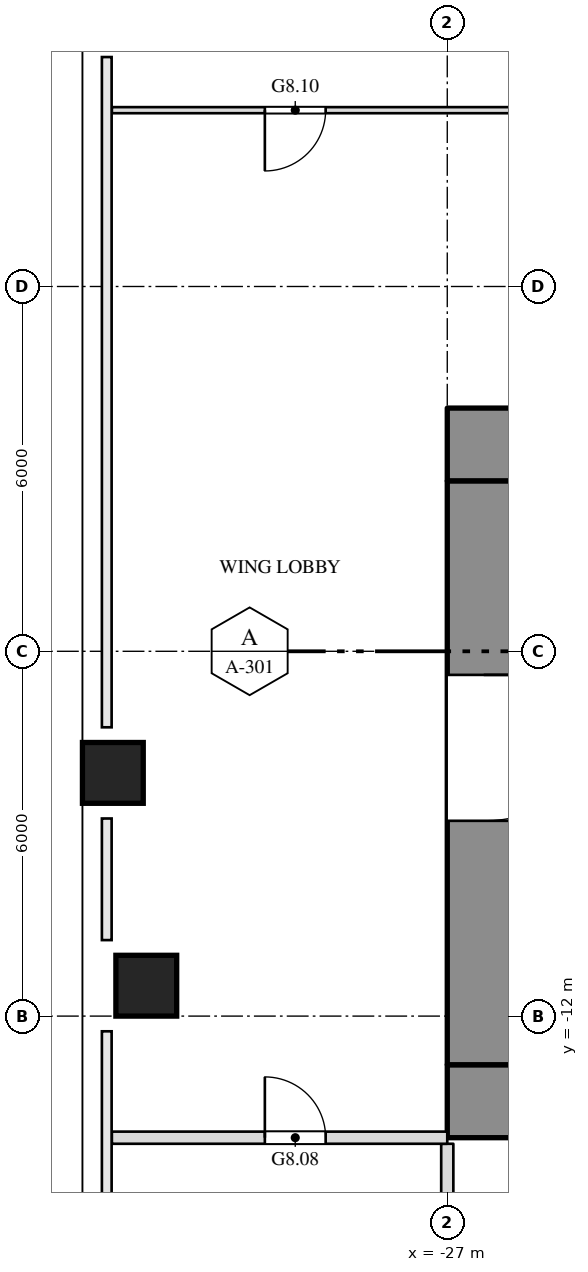
"""IFC4 building model, lengths in metres.
Left out: names, types, materials, properties, quantities, classifications, styles, units other than length and angle.
Written with IfcOpenShell. Run it as: python <this file> out.ifc"""

import sys

from ifc_helpers import new_model, si_unit, direction, frame, frame_2d, origin, origin_2d, place, context, subcontext, project, spatial, rectangle, extrude, element, fill, save


model = new_model("IFC4")
c1 = context("Model", 3, precision=1e-05, world=origin(), true_north=direction((0.0, 1.0)))
c2 = subcontext(c1, "Body", "Model", "MODEL_VIEW")
j1 = project(units=[si_unit("LENGTHUNIT", "METRE"), si_unit("PLANEANGLEUNIT", "RADIAN")], contexts=[c1])
p1 = place(None, origin())
s1 = spatial("IfcSite", under=j1, at=p1, CompositionType="ELEMENT")
p2 = place(p1, origin())
s2 = spatial("IfcBuilding", under=s1, at=p2, CompositionType="ELEMENT")
p3 = place(p2, frame((0.0, 0.0, 48.0)))
s3 = spatial("IfcBuildingStorey", under=s2, at=p3, CompositionType="ELEMENT", Elevation=48.0)
for number, where, z_axis, x_axis in (
    (1, (-31.95, -11.5, 0.0), (0.0, 0.0, 1.0), (1.0, 0.0, 0.0)),
    (2, (-32.5, -8.0, 0.0), (0.0, 0.0, 1.0), (1.0, 0.0, 0.0)),
):
    element("IfcColumn", number, at=place(p3, frame(where, z_axis=z_axis, x_axis=x_axis)), inside=s3, PredefinedType="COLUMN", context=c2, shape_type="SweptSolid", body=[
        extrude(rectangle(XDim=1.0, YDim=1.0, at=origin_2d()), origin(), (0.0, 0.0, 1.0), 4.5),
    ])
p4 = place(p3, frame((-27.0, -2.6, 0.0), z_axis=(0.0, 0.0, 1.0), x_axis=(1.0, 0.0, 0.0)))
e3 = element("IfcWall", 3, at=p4, inside=s3, PredefinedType="SHEAR", context=c2, shape_type="SweptSolid", body=[
    extrude(rectangle(XDim=54.0, YDim=1.2, at=frame_2d((27.0, 0.0))), origin(), (0.0, 0.0, 1.0), 4.3),
])
p5 = place(p4, frame((15.15, 0.0, 0.0)))
e4 = element("IfcOpeningElement", 4, at=p5, cuts=e3, PredefinedType="OPENING", context=c2, shape_type="SweptSolid", body=[
    extrude(rectangle(XDim=2.4, YDim=2.1, at=frame_2d((1.2, 1.05))), frame((0.0, 0.612, 0.0), z_axis=(0.0, -1.0, 0.0), x_axis=(1.0, 0.0, 0.0)), (0.0, 0.0, 1.0), 1.224),
])
p6 = place(p4, frame((36.45, 0.0, 0.0)))
e5 = element("IfcOpeningElement", 5, at=p6, cuts=e3, PredefinedType="OPENING", context=c2, shape_type="SweptSolid", body=[
    extrude(rectangle(XDim=2.4, YDim=2.1, at=frame_2d((1.2, 1.05))), frame((0.0, 0.612, 0.0), z_axis=(0.0, -1.0, 0.0), x_axis=(1.0, 0.0, 0.0)), (0.0, 0.0, 1.0), 1.224),
])
p7 = place(p3, frame((-27.0, -13.4, 0.0), z_axis=(0.0, 0.0, 1.0), x_axis=(1.0, 0.0, 0.0)))
e6 = element("IfcWall", 6, at=p7, inside=s3, PredefinedType="SHEAR", context=c2, shape_type="SweptSolid", body=[
    extrude(rectangle(XDim=54.0, YDim=1.2, at=frame_2d((27.0, 0.0))), origin(), (0.0, 0.0, 1.0), 4.3),
])
p8 = place(p7, frame((16.45, 0.0, 0.0)))
e7 = element("IfcOpeningElement", 7, at=p8, cuts=e6, PredefinedType="OPENING", context=c2, shape_type="SweptSolid", body=[
    extrude(rectangle(XDim=1.0, YDim=2.1, at=frame_2d((0.5, 1.05))), frame((0.0, 0.612, 0.0), z_axis=(0.0, -1.0, 0.0), x_axis=(1.0, 0.0, 0.0)), (0.0, 0.0, 1.0), 1.224),
])
p9 = place(p7, frame((36.55, 0.0, 0.0)))
e8 = element("IfcOpeningElement", 8, at=p9, cuts=e6, PredefinedType="OPENING", context=c2, shape_type="SweptSolid", body=[
    extrude(rectangle(XDim=1.0, YDim=2.1, at=frame_2d((0.5, 1.05))), frame((0.0, 0.612, 0.0), z_axis=(0.0, -1.0, 0.0), x_axis=(1.0, 0.0, 0.0)), (0.0, 0.0, 1.0), 1.224),
])
p10 = place(p3, frame((-26.4, -12.8, 0.0), z_axis=(0.0, 0.0, 1.0), x_axis=(0.0, 1.0, 0.0)))
e9 = element("IfcWall", 9, at=p10, inside=s3, PredefinedType="SHEAR", context=c2, shape_type="SweptSolid", body=[
    extrude(rectangle(XDim=9.6, YDim=1.2, at=frame_2d((4.8, 0.0))), origin(), (0.0, 0.0, 1.0), 4.3),
])
p11 = place(p10, frame((4.012, 0.0, 0.0)))
e10 = element("IfcOpeningElement", 10, at=p11, cuts=e9, PredefinedType="OPENING", context=c2, shape_type="SweptSolid", body=[
    extrude(rectangle(XDim=2.4, YDim=2.1, at=frame_2d((1.2, 1.05))), frame((0.0, 0.612, 0.0), z_axis=(0.0, -1.0, 0.0), x_axis=(1.0, 0.0, 0.0)), (0.0, 0.0, 1.0), 1.224),
])
p12 = place(p3, frame((-27.0, -17.0, 0.0), z_axis=(0.0, 0.0, 1.0), x_axis=(0.0, 1.0, 0.0)))
e11 = element("IfcWall", 11, at=p12, inside=s3, PredefinedType="PARTITIONING", context=c2, shape_type="SweptSolid", body=[
    extrude(rectangle(XDim=2.9, YDim=0.2, at=frame_2d((1.45, 0.0))), origin(), (0.0, 0.0, 1.0), 3.688),
])
p13 = place(p3, frame((-32.516, -14.0, 0.0), z_axis=(0.0, 0.0, 1.0), x_axis=(1.0, 0.0, 0.0)))
e12 = element("IfcWall", 12, at=p13, inside=s3, PredefinedType="PARTITIONING", context=c2, shape_type="SweptSolid", body=[
    extrude(rectangle(XDim=5.516, YDim=0.2, at=frame_2d((2.758, 0.0))), origin(), (0.0, 0.0, 1.0), 4.3),
])
p14 = place(p13, frame((2.516, 0.0, 0.0)))
e13 = element("IfcOpeningElement", 13, at=p14, cuts=e12, PredefinedType="OPENING", context=c2, shape_type="SweptSolid", body=[
    extrude(rectangle(XDim=1.0, YDim=2.1, at=frame_2d((0.5, 1.05))), frame((0.0, 0.112, 0.0), z_axis=(0.0, -1.0, 0.0), x_axis=(1.0, 0.0, 0.0)), (0.0, 0.0, 1.0), 0.224),
])
p15 = place(p3, frame((-32.516, 2.9, 0.0), z_axis=(0.0, 0.0, 1.0), x_axis=(1.0, 0.0, 0.0)))
e14 = element("IfcWall", 14, at=p15, inside=s3, PredefinedType="PARTITIONING", context=c2, shape_type="SweptSolid", body=[
    extrude(rectangle(XDim=65.032, YDim=0.1, at=frame_2d((32.516, 0.0))), origin(), (0.0, 0.0, 1.0), 4.3),
])
p16 = place(p15, frame((2.516, 0.0, 0.0)))
e15 = element("IfcOpeningElement", 15, at=p16, cuts=e14, PredefinedType="OPENING", context=c2, shape_type="SweptSolid", body=[
    extrude(rectangle(XDim=1.0, YDim=2.1, at=frame_2d((0.5, 1.05))), frame((0.0, 0.062, 0.0), z_axis=(0.0, -1.0, 0.0), x_axis=(1.0, 0.0, 0.0)), (0.0, 0.0, 1.0), 0.124),
])
p17 = place(p15, frame((8.616, 0.0, 0.0)))
e16 = element("IfcOpeningElement", 16, at=p17, cuts=e14, PredefinedType="OPENING", context=c2, shape_type="SweptSolid", body=[
    extrude(rectangle(XDim=1.8, YDim=2.1, at=frame_2d((0.9, 1.05))), frame((0.0, 0.062, 0.0), z_axis=(0.0, -1.0, 0.0), x_axis=(1.0, 0.0, 0.0)), (0.0, 0.0, 1.0), 0.124),
])
p18 = place(p15, frame((17.466, 0.0, 0.0)))
e17 = element("IfcOpeningElement", 17, at=p18, cuts=e14, PredefinedType="OPENING", context=c2, shape_type="SweptSolid", body=[
    extrude(rectangle(XDim=2.1, YDim=2.4, at=frame_2d((1.05, 1.2))), frame((0.0, 0.062, 0.0), z_axis=(0.0, -1.0, 0.0), x_axis=(1.0, 0.0, 0.0)), (0.0, 0.0, 1.0), 0.124),
])
p19 = place(p15, frame((26.966, 0.0, 0.0)))
e18 = element("IfcOpeningElement", 18, at=p19, cuts=e14, PredefinedType="OPENING", context=c2, shape_type="SweptSolid", body=[
    extrude(rectangle(XDim=2.1, YDim=2.4, at=frame_2d((1.05, 1.2))), frame((0.0, 0.062, 0.0), z_axis=(0.0, -1.0, 0.0), x_axis=(1.0, 0.0, 0.0)), (0.0, 0.0, 1.0), 0.124),
])
p20 = place(p15, frame((36.116, 0.0, 0.0)))
e19 = element("IfcOpeningElement", 19, at=p20, cuts=e14, PredefinedType="OPENING", context=c2, shape_type="SweptSolid", body=[
    extrude(rectangle(XDim=1.8, YDim=2.1, at=frame_2d((0.9, 1.05))), frame((0.0, 0.062, 0.0), z_axis=(0.0, -1.0, 0.0), x_axis=(1.0, 0.0, 0.0)), (0.0, 0.0, 1.0), 0.124),
])
p21 = place(p15, frame((43.016, 0.0, 0.0)))
e20 = element("IfcOpeningElement", 20, at=p21, cuts=e14, PredefinedType="OPENING", context=c2, shape_type="SweptSolid", body=[
    extrude(rectangle(XDim=1.0, YDim=2.1, at=frame_2d((0.5, 1.05))), frame((0.0, 0.062, 0.0), z_axis=(0.0, -1.0, 0.0), x_axis=(1.0, 0.0, 0.0)), (0.0, 0.0, 1.0), 0.124),
])
p22 = place(p15, frame((47.966, 0.0, 0.0)))
e21 = element("IfcOpeningElement", 21, at=p22, cuts=e14, PredefinedType="OPENING", context=c2, shape_type="SweptSolid", body=[
    extrude(rectangle(XDim=2.1, YDim=2.4, at=frame_2d((1.05, 1.2))), frame((0.0, 0.062, 0.0), z_axis=(0.0, -1.0, 0.0), x_axis=(1.0, 0.0, 0.0)), (0.0, 0.0, 1.0), 0.124),
])
p23 = place(p15, frame((54.466, 0.0, 0.0)))
e22 = element("IfcOpeningElement", 22, at=p23, cuts=e14, PredefinedType="OPENING", context=c2, shape_type="SweptSolid", body=[
    extrude(rectangle(XDim=2.1, YDim=2.4, at=frame_2d((1.05, 1.2))), frame((0.0, 0.062, 0.0), z_axis=(0.0, -1.0, 0.0), x_axis=(1.0, 0.0, 0.0)), (0.0, 0.0, 1.0), 0.124),
])
p24 = place(p15, frame((61.516, 0.0, 0.0)))
e23 = element("IfcOpeningElement", 23, at=p24, cuts=e14, PredefinedType="OPENING", context=c2, shape_type="SweptSolid", body=[
    extrude(rectangle(XDim=1.0, YDim=2.1, at=frame_2d((0.5, 1.05))), frame((0.0, 0.062, 0.0), z_axis=(0.0, -1.0, 0.0), x_axis=(1.0, 0.0, 0.0)), (0.0, 0.0, 1.0), 0.124),
])
p25 = place(p14, origin())
e24 = element("IfcDoor", 24, at=p25, inside=s3, OperationType="SINGLE_SWING_LEFT", PredefinedType="DOOR", context=c2, shape_type="SweptSolid", body=[
    extrude(rectangle(XDim=1.0, YDim=2.1, at=frame_2d((0.5, 1.05))), frame((0.0, 0.025, 0.0), z_axis=(0.0, -1.0, 0.0), x_axis=(1.0, 0.0, 0.0)), (0.0, 0.0, 1.0), 0.05),
])
fill(e13, e24)
p26 = place(p16, origin())
e25 = element("IfcDoor", 25, at=p26, inside=s3, OperationType="SINGLE_SWING_RIGHT", PredefinedType="DOOR", context=c2, shape_type="SweptSolid", body=[
    extrude(rectangle(XDim=1.0, YDim=2.1, at=frame_2d((0.5, 1.05))), frame((0.0, 0.025, 0.0), z_axis=(0.0, -1.0, 0.0), x_axis=(1.0, 0.0, 0.0)), (0.0, 0.0, 1.0), 0.05),
])
fill(e15, e25)
p27 = place(p11, origin())
e26 = element("IfcDoor", 26, at=p27, inside=s3, OperationType="DOUBLE_DOOR_SINGLE_SWING", PredefinedType="DOOR", context=c2, shape_type="SweptSolid", body=[
    extrude(rectangle(XDim=2.4, YDim=2.1, at=frame_2d((1.2, 1.05))), frame((0.0, 0.025, 0.0), z_axis=(0.0, -1.0, 0.0), x_axis=(1.0, 0.0, 0.0)), (0.0, 0.0, 1.0), 0.05),
])
fill(e10, e26)
save(model, sys.argv[1])
